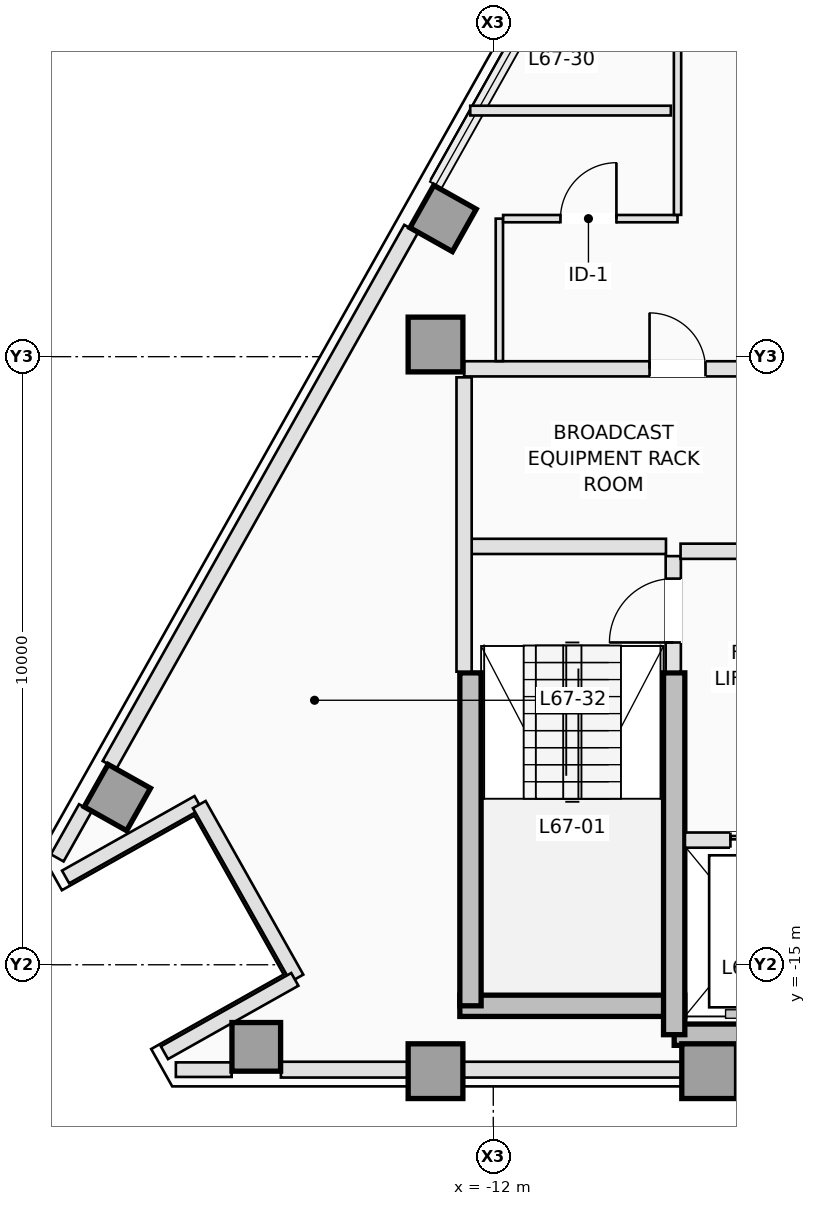
"""IFC4 building model, lengths in metres.
Left out: names, types, materials, properties, quantities, classifications, styles, units other than length and angle.
Written with IfcOpenShell. Run it as: python <this file> out.ifc"""

import sys

from ifc_helpers import new_model, si_unit, direction, frame, frame_2d, origin, origin_2d, place, context, subcontext, project, spatial, rectangle, extrude, element, fill, save


model = new_model("IFC4")
c1 = context("Model", 3, precision=1e-05, world=origin(), true_north=direction((0.0, 1.0)))
c2 = subcontext(c1, "Body", "Model", "MODEL_VIEW")
j1 = project(units=[si_unit("LENGTHUNIT", "METRE"), si_unit("PLANEANGLEUNIT", "RADIAN")], contexts=[c1])
p1 = place(None, origin())
s1 = spatial("IfcSite", under=j1, at=p1, CompositionType="ELEMENT")
p2 = place(p1, origin())
s2 = spatial("IfcBuilding", under=s1, at=p2, CompositionType="ELEMENT")
p3 = place(p2, frame((0.0, 0.0, 242.9)))
s3 = spatial("IfcBuildingStorey", under=s2, at=p3, CompositionType="ELEMENT", Elevation=242.9)
p4 = place(p3, frame((-12.55, -15.675, 0.0), z_axis=(0.0, 0.0, 1.0), x_axis=(1.0, 0.0, 0.0)))
e1 = element("IfcWall", 1, at=p4, inside=s3, PredefinedType="SHEAR", context=c2, shape_type="SweptSolid", body=[
    extrude(rectangle(XDim=3.7, YDim=0.35, at=frame_2d((1.85, 0.0))), origin(), (0.0, 0.0, 1.0), 3.5),
])
p5 = place(p3, frame((-9.025, -16.15, 0.0), z_axis=(0.0, 0.0, 1.0), x_axis=(1.0, 0.0, 0.0)))
e2 = element("IfcWall", 2, at=p5, inside=s3, PredefinedType="SHEAR", context=c2, shape_type="SweptSolid", body=[
    extrude(rectangle(XDim=5.275, YDim=0.35, at=frame_2d((2.637, 0.0))), origin(), (0.0, 0.0, 1.0), 3.5),
])
p6 = place(p3, frame((-12.375, -15.675, 0.0), z_axis=(0.0, 0.0, 1.0), x_axis=(0.0, 1.0, 0.0)))
e3 = element("IfcWall", 3, at=p6, inside=s3, PredefinedType="SHEAR", context=c2, shape_type="SweptSolid", body=[
    extrude(rectangle(XDim=5.475, YDim=0.35, at=frame_2d((2.738, 0.0))), origin(), (0.0, 0.0, 1.0), 3.5),
])
p7 = place(p3, frame((-9.025, -16.15, 0.0), z_axis=(0.0, 0.0, 1.0), x_axis=(0.0, 1.0, 0.0)))
e4 = element("IfcWall", 4, at=p7, inside=s3, PredefinedType="SHEAR", context=c2, shape_type="SweptSolid", body=[
    extrude(rectangle(XDim=5.95, YDim=0.35, at=frame_2d((2.975, 0.0))), origin(), (0.0, 0.0, 1.0), 3.5),
])
for number, where, z_axis, x_axis in (
    (5, (-12.95, -16.75, 0.0), (0.0, 0.0, 1.0), (1.0, 0.0, 0.0)),
    (6, (-8.45, -16.75, 0.0), (0.0, 0.0, 1.0), (1.0, 0.0, 0.0)),
    (7, (-12.95, -4.8, 0.0), (0.0, 0.0, 1.0), (1.0, 0.0, 0.0)),
):
    element("IfcColumn", number, at=place(p3, frame(where, z_axis=z_axis, x_axis=x_axis)), inside=s3, PredefinedType="COLUMN", context=c2, shape_type="SweptSolid", body=[
        extrude(rectangle(XDim=0.9, YDim=0.9, at=origin_2d()), origin(), (0.0, 0.0, 1.0), 3.5),
    ])
for number, where, z_axis, x_axis in (
    (8, (-15.898, -16.35, 0.0), (0.0, 0.0, 1.0), (0.0, 1.0, 0.0)),
    (9, (-12.825, -2.727, 0.0), (0.0, 0.0, 1.0), (-0.872, 0.49, 0.0)),
    (10, (-18.182, -12.25, 0.0), (0.0, 0.0, 1.0), (-0.872, 0.49, 0.0)),
):
    element("IfcColumn", number, at=place(p3, frame(where, z_axis=z_axis, x_axis=x_axis)), inside=s3, PredefinedType="COLUMN", context=c2, shape_type="SweptSolid", body=[
        extrude(rectangle(XDim=0.8, YDim=0.8, at=origin_2d()), origin(), (0.0, 0.0, 1.0), 3.5),
    ])
p8 = place(p3, frame((-16.302, -16.725, 0.0), z_axis=(0.0, 0.0, 1.0), x_axis=(-1.0, 0.0, 0.0)))
e11 = element("IfcWall", 11, at=p8, inside=s3, PredefinedType="STANDARD", context=c2, shape_type="SweptSolid", body=[
    extrude(rectangle(XDim=0.917, YDim=0.24, at=frame_2d((0.459, 0.0))), origin(), (0.0, 0.0, 1.0), 3.25),
])
p9 = place(p3, frame((-4.22, -16.725, 0.0), z_axis=(0.0, 0.0, 1.0), x_axis=(-1.0, 0.0, 0.0)))
e12 = element("IfcWall", 12, at=p9, inside=s3, PredefinedType="STANDARD", context=c2, shape_type="SweptSolid", body=[
    extrude(rectangle(XDim=11.273, YDim=0.26, at=frame_2d((5.636, 0.0))), origin(), (0.0, 0.0, 1.0), 2.79),
])
p10 = place(p3, frame((-19.171, -13.242, 0.0), z_axis=(0.0, 0.0, 1.0), x_axis=(0.490199895283, 0.871610040479, 0.0)))
e13 = element("IfcWall", 13, at=p10, inside=s3, PredefinedType="STANDARD", context=c2, shape_type="SweptSolid", body=[
    extrude(rectangle(XDim=0.945, YDim=0.24, at=frame_2d((0.472, 0.0))), origin(), (0.0, 0.0, 1.0), 3.25),
])
p11 = place(p3, frame((-18.311, -11.713, 0.0), z_axis=(0.0, 0.0, 1.0), x_axis=(0.490266968583, 0.871572314565, 0.0)))
e14 = element("IfcWall", 14, at=p11, inside=s3, PredefinedType="STANDARD", context=c2, shape_type="SweptSolid", body=[
    extrude(rectangle(XDim=10.116, YDim=0.26, at=frame_2d((5.058, 0.0))), origin(), (0.0, 0.0, 1.0), 3.25),
])
p12 = place(p3, frame((-19.033, -13.556, 0.0), z_axis=(0.0, 0.0, 1.0), x_axis=(0.871588577066, 0.490238056792, 0.0)))
e15 = element("IfcWall", 15, at=p12, inside=s3, PredefinedType="STANDARD", context=c2, shape_type="SweptSolid", body=[
    extrude(rectangle(XDim=2.5, YDim=0.24, at=frame_2d((1.25, 0.0))), origin(), (0.0, 0.0, 1.0), 3.25),
])
p13 = place(p3, frame((-16.835, -12.366, 0.0), z_axis=(0.0, 0.0, 1.0), x_axis=(0.490293083368, -0.871557624258, 0.0)))
e16 = element("IfcWall", 16, at=p13, inside=s3, PredefinedType="STANDARD", context=c2, shape_type="SweptSolid", body=[
    extrude(rectangle(XDim=3.276, YDim=0.24, at=frame_2d((1.638, 0.0))), origin(), (0.0, 0.0, 1.0), 2.79),
])
p14 = place(p3, frame((-15.264, -15.24, 0.0), z_axis=(0.0, 0.0, 1.0), x_axis=(-0.87157023615, -0.490270663468, 0.0)))
e17 = element("IfcWall", 17, at=p14, inside=s3, PredefinedType="STANDARD", context=c2, shape_type="SweptSolid", body=[
    extrude(rectangle(XDim=2.46, YDim=0.24, at=frame_2d((1.23, 0.0))), origin(), (0.0, 0.0, 1.0), 3.25),
])
p15 = place(p3, frame((-9.04, -10.18, 0.0), z_axis=(0.0, 0.0, 1.0), x_axis=(0.0, 1.0, 0.0)))
e18 = element("IfcWall", 18, at=p15, inside=s3, PredefinedType="PARTITIONING", context=c2, shape_type="SweptSolid", body=[
    extrude(rectangle(XDim=1.9, YDim=0.25, at=frame_2d((0.95, 0.0))), origin(), (0.0, 0.0, 1.0), 3.25),
])
p16 = place(p15, frame((0.48, 0.0, 0.0)))
e19 = element("IfcOpeningElement", 19, at=p16, cuts=e18, PredefinedType="OPENING", context=c2, shape_type="SweptSolid", body=[
    extrude(rectangle(XDim=1.05, YDim=2.15, at=frame_2d((0.525, 1.075))), frame((0.0, 0.135, 0.0), z_axis=(0.0, -1.0, 0.0), x_axis=(1.0, 0.0, 0.0)), (0.0, 0.0, 1.0), 0.27),
])
p17 = place(p3, frame((-12.38, -8.12, 0.0), z_axis=(0.0, 0.0, 1.0), x_axis=(1.0, 0.0, 0.0)))
e20 = element("IfcWall", 20, at=p17, inside=s3, PredefinedType="PARTITIONING", context=c2, shape_type="SweptSolid", body=[
    extrude(rectangle(XDim=3.22, YDim=0.25, at=frame_2d((1.61, 0.0))), origin(), (0.0, 0.0, 1.0), 3.25),
])
p18 = place(p3, frame((-12.48, -10.18, 0.0), z_axis=(0.0, 0.0, 1.0), x_axis=(0.0, 1.0, 0.0)))
e21 = element("IfcWall", 21, at=p18, inside=s3, PredefinedType="PARTITIONING", context=c2, shape_type="SweptSolid", body=[
    extrude(rectangle(XDim=4.84, YDim=0.25, at=frame_2d((2.42, 0.0))), origin(), (0.0, 0.0, 1.0), 3.25),
])
p19 = place(p3, frame((-8.848, -12.95, 0.0), z_axis=(0.0, 0.0, 1.0), x_axis=(1.0, 0.0, 0.0)))
e22 = element("IfcWall", 22, at=p19, inside=s3, PredefinedType="PARTITIONING", context=c2, shape_type="SweptSolid", body=[
    extrude(rectangle(XDim=5.168, YDim=0.25, at=frame_2d((2.584, 0.0))), origin(), (0.0, 0.0, 1.0), 3.25),
])
p20 = place(p19, frame((0.748, 0.0, 0.0)))
e23 = element("IfcOpeningElement", 23, at=p20, cuts=e22, PredefinedType="OPENING", context=c2, shape_type="SweptSolid", body=[
    extrude(rectangle(XDim=1.1, YDim=2.15, at=frame_2d((0.55, 1.075))), frame((0.0, 0.135, 0.0), z_axis=(0.0, -1.0, 0.0), x_axis=(1.0, 0.0, 0.0)), (0.0, 0.0, 1.0), 0.27),
])
p21 = place(p19, frame((2.648, 0.0, 0.0)))
e24 = element("IfcOpeningElement", 24, at=p21, cuts=e22, PredefinedType="OPENING", context=c2, shape_type="SweptSolid", body=[
    extrude(rectangle(XDim=0.88, YDim=2.1, at=frame_2d((0.44, 1.05))), frame((0.0, 0.135, 0.0), z_axis=(0.0, -1.0, 0.0), x_axis=(1.0, 0.0, 0.0)), (0.0, 0.0, 1.0), 0.27),
])
p22 = place(p19, frame((4.048, 0.0, 0.0)))
e25 = element("IfcOpeningElement", 25, at=p22, cuts=e22, PredefinedType="OPENING", context=c2, shape_type="SweptSolid", body=[
    extrude(rectangle(XDim=0.88, YDim=2.1, at=frame_2d((0.44, 1.05))), frame((0.0, 0.135, 0.0), z_axis=(0.0, -1.0, 0.0), x_axis=(1.0, 0.0, 0.0)), (0.0, 0.0, 1.0), 0.27),
])
p23 = place(p3, frame((-8.92, -8.2, 0.0), z_axis=(0.0, 0.0, 1.0), x_axis=(1.0, 0.0, 0.0)))
e26 = element("IfcWall", 26, at=p23, inside=s3, PredefinedType="PARTITIONING", context=c2, shape_type="SweptSolid", body=[
    extrude(rectangle(XDim=5.24, YDim=0.25, at=frame_2d((2.62, 0.0))), origin(), (0.0, 0.0, 1.0), 3.25),
])
p24 = place(p3, frame((-12.48, -5.2, 0.0), z_axis=(0.0, 0.0, 1.0), x_axis=(1.0, 0.0, 0.0)))
e27 = element("IfcWall", 27, at=p24, inside=s3, PredefinedType="PARTITIONING", context=c2, shape_type="SweptSolid", body=[
    extrude(rectangle(XDim=8.278, YDim=0.25, at=frame_2d((4.139, 0.0))), origin(), (0.0, 0.0, 1.0), 3.25),
])
p25 = place(p24, frame((3.05, 0.0, 0.0)))
e28 = element("IfcOpeningElement", 28, at=p25, cuts=e27, PredefinedType="OPENING", context=c2, shape_type="SweptSolid", body=[
    extrude(rectangle(XDim=0.92, YDim=2.12, at=frame_2d((0.46, 1.06))), frame((0.0, 0.135, 0.0), z_axis=(0.0, -1.0, 0.0), x_axis=(1.0, 0.0, 0.0)), (0.0, 0.0, 1.0), 0.27),
])
p26 = place(p24, frame((6.15, 0.0, 0.0)))
e29 = element("IfcOpeningElement", 29, at=p26, cuts=e27, PredefinedType="OPENING", context=c2, shape_type="SweptSolid", body=[
    extrude(rectangle(XDim=0.92, YDim=2.12, at=frame_2d((0.46, 1.06))), frame((0.0, 0.135, 0.0), z_axis=(0.0, -1.0, 0.0), x_axis=(1.0, 0.0, 0.0)), (0.0, 0.0, 1.0), 0.27),
])
p27 = place(p3, frame((-11.9, -5.073, 0.0), z_axis=(0.0, 0.0, 1.0), x_axis=(0.0, 1.0, 0.0)))
e30 = element("IfcWall", 30, at=p27, inside=s3, PredefinedType="PARTITIONING", context=c2, shape_type="SweptSolid", body=[
    extrude(rectangle(XDim=2.343, YDim=0.12, at=frame_2d((1.171, 0.0))), origin(), (0.0, 0.0, 1.0), 3.25),
])
p28 = place(p3, frame((-11.838, -2.73, 0.0), z_axis=(0.0, 0.0, 1.0), x_axis=(1.0, 0.0, 0.0)))
e31 = element("IfcWall", 31, at=p28, inside=s3, PredefinedType="PARTITIONING", context=c2, shape_type="SweptSolid", body=[
    extrude(rectangle(XDim=2.868, YDim=0.12, at=frame_2d((1.434, 0.0))), origin(), (0.0, 0.0, 1.0), 3.25),
])
p29 = place(p28, frame((0.943, 0.0, 0.0)))
e32 = element("IfcOpeningElement", 32, at=p29, cuts=e31, PredefinedType="OPENING", context=c2, shape_type="SweptSolid", body=[
    extrude(rectangle(XDim=0.92, YDim=2.12, at=frame_2d((0.46, 1.06))), frame((0.0, 0.07, 0.0), z_axis=(0.0, -1.0, 0.0), x_axis=(1.0, 0.0, 0.0)), (0.0, 0.0, 1.0), 0.14),
])
p30 = place(p3, frame((-8.97, -2.668, 0.0), z_axis=(0.0, 0.0, 1.0), x_axis=(0.0, 1.0, 0.0)))
e33 = element("IfcWall", 33, at=p30, inside=s3, PredefinedType="PARTITIONING", context=c2, shape_type="SweptSolid", body=[
    extrude(rectangle(XDim=5.286, YDim=0.12, at=frame_2d((2.643, 0.0))), origin(), (0.0, 0.0, 1.0), 3.25),
])
p31 = place(p30, frame((2.791, 0.0, 0.0)))
e34 = element("IfcOpeningElement", 34, at=p31, cuts=e33, PredefinedType="OPENING", context=c2, shape_type="SweptSolid", body=[
    extrude(rectangle(XDim=0.92, YDim=2.12, at=frame_2d((0.46, 1.06))), frame((0.0, 0.07, 0.0), z_axis=(0.0, -1.0, 0.0), x_axis=(1.0, 0.0, 0.0)), (0.0, 0.0, 1.0), 0.14),
])
p32 = place(p3, frame((-9.08, -0.953, 0.0), z_axis=(0.0, 0.0, 1.0), x_axis=(-1.0, 0.0, 0.0)))
e35 = element("IfcWall", 35, at=p32, inside=s3, PredefinedType="PARTITIONING", context=c2, shape_type="SweptSolid", body=[
    extrude(rectangle(XDim=3.299, YDim=0.16, at=frame_2d((1.649, 0.0))), origin(), (0.0, 0.0, 1.0), 3.25),
])
p33 = place(p20, origin())
e36 = element("IfcDoor", 36, at=p33, inside=s3, OperationType="SLIDING_TO_LEFT", PredefinedType="DOOR", context=c2, shape_type="SweptSolid", body=[
    extrude(rectangle(XDim=1.1, YDim=2.15, at=frame_2d((0.55, 1.075))), frame((0.0, 0.025, 0.0), z_axis=(0.0, -1.0, 0.0), x_axis=(1.0, 0.0, 0.0)), (0.0, 0.0, 1.0), 0.05),
])
fill(e23, e36)
p34 = place(p16, origin())
e37 = element("IfcDoor", 37, at=p34, inside=s3, OperationType="SINGLE_SWING_LEFT", PredefinedType="DOOR", context=c2, shape_type="SweptSolid", body=[
    extrude(rectangle(XDim=1.05, YDim=2.15, at=frame_2d((0.525, 1.075))), frame((0.0, 0.025, 0.0), z_axis=(0.0, -1.0, 0.0), x_axis=(1.0, 0.0, 0.0)), (0.0, 0.0, 1.0), 0.05),
])
fill(e19, e37)
p35 = place(p25, origin())
e38 = element("IfcDoor", 38, at=p35, inside=s3, OperationType="SINGLE_SWING_LEFT", PredefinedType="DOOR", context=c2, shape_type="SweptSolid", body=[
    extrude(rectangle(XDim=0.92, YDim=2.12, at=frame_2d((0.46, 1.06))), frame((0.0, 0.025, 0.0), z_axis=(0.0, -1.0, 0.0), x_axis=(1.0, 0.0, 0.0)), (0.0, 0.0, 1.0), 0.05),
])
fill(e28, e38)
p36 = place(p29, origin())
e39 = element("IfcDoor", 39, at=p36, inside=s3, OperationType="SINGLE_SWING_RIGHT", PredefinedType="DOOR", context=c2, shape_type="SweptSolid", body=[
    extrude(rectangle(XDim=0.92, YDim=2.12, at=frame_2d((0.46, 1.06))), frame((0.0, 0.025, 0.0), z_axis=(0.0, -1.0, 0.0), x_axis=(1.0, 0.0, 0.0)), (0.0, 0.0, 1.0), 0.05),
])
fill(e32, e39)
save(model, sys.argv[1])
